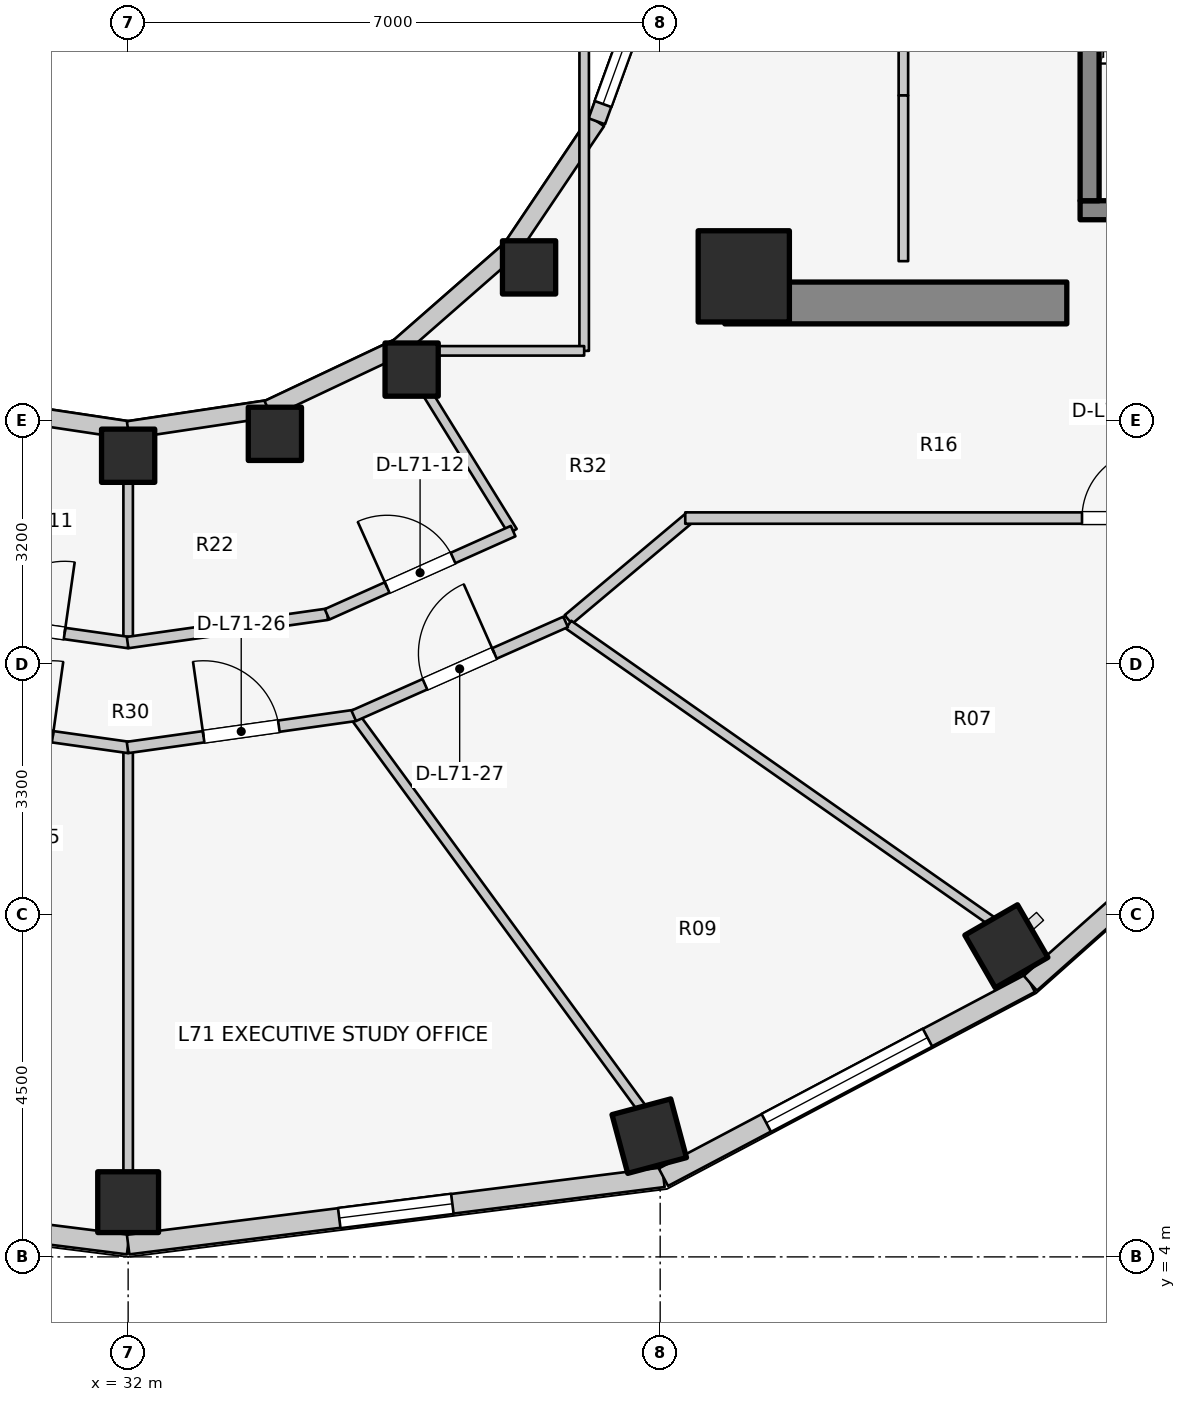
"""IFC4 building model, lengths in metres.
Left out: names, types, materials, properties, quantities, classifications, styles, units other than length and angle.
Written with IfcOpenShell. Run it as: python <this file> out.ifc"""

import sys

from ifc_helpers import new_model, si_unit, direction, frame, frame_2d, origin, origin_2d, place, context, subcontext, project, spatial, rectangle, extrude, element, fill, save


model = new_model("IFC4")
c1 = context("Model", 3, precision=1e-05, world=origin(), true_north=direction((0.0, 1.0)))
c2 = subcontext(c1, "Body", "Model", "MODEL_VIEW")
j1 = project(units=[si_unit("LENGTHUNIT", "METRE"), si_unit("PLANEANGLEUNIT", "RADIAN")], contexts=[c1])
p1 = place(None, origin())
s1 = spatial("IfcSite", under=j1, at=p1, CompositionType="ELEMENT")
p2 = place(p1, origin())
s2 = spatial("IfcBuilding", under=s1, at=p2, CompositionType="ELEMENT")
p3 = place(p2, frame((0.0, 0.0, 232.6)))
s3 = spatial("IfcBuildingStorey", under=s2, at=p3, CompositionType="ELEMENT", Elevation=232.6)
p4 = place(p3, frame((39.85, 16.55, 0.0), z_axis=(0.0, 0.0, 1.0), x_axis=(1.0, 0.0, 0.0)))
e1 = element("IfcWall", 1, at=p4, inside=s3, PredefinedType="SHEAR", context=c2, shape_type="SweptSolid", body=[
    extrude(rectangle(XDim=4.5, YDim=0.55, at=frame_2d((2.25, 0.0))), origin(), (0.0, 0.0, 1.0), 3.1),
])
p5 = place(p3, frame((44.525, 17.77, 0.0), z_axis=(0.0, 0.0, 1.0), x_axis=(1.0, 0.0, 0.0)))
e2 = element("IfcWall", 2, at=p5, inside=s3, PredefinedType="SOLIDWALL", context=c2, shape_type="SweptSolid", body=[
    extrude(rectangle(XDim=3.37, YDim=0.25, at=frame_2d((1.685, 0.0))), origin(), (0.0, 0.0, 1.0), 3.1),
])
p6 = place(p5, frame((1.135, 0.0, 0.0)))
e3 = element("IfcOpeningElement", 3, at=p6, cuts=e2, PredefinedType="OPENING", context=c2, shape_type="SweptSolid", body=[
    extrude(rectangle(XDim=1.1, YDim=2.1, at=frame_2d((0.55, 1.05))), frame((0.0, 0.135, 0.0), z_axis=(0.0, -1.0, 0.0), x_axis=(1.0, 0.0, 0.0)), (0.0, 0.0, 1.0), 0.27),
])
p7 = place(p3, frame((44.65, 17.895, 0.0), z_axis=(0.0, 0.0, 1.0), x_axis=(0.0, 1.0, 0.0)))
e4 = element("IfcWall", 4, at=p7, inside=s3, PredefinedType="SOLIDWALL", context=c2, shape_type="SweptSolid", body=[
    extrude(rectangle(XDim=7.81, YDim=0.25, at=frame_2d((3.905, 0.0))), origin(), (0.0, 0.0, 1.0), 3.1),
])
p8 = place(p3, frame((40.1, 16.9, 0.0), z_axis=(0.0, 0.0, 1.0), x_axis=(1.0, 0.0, 0.0)))
e5 = element("IfcColumn", 5, at=p8, inside=s3, PredefinedType="COLUMN", context=c2, shape_type="SweptSolid", body=[
    extrude(rectangle(XDim=1.2, YDim=1.2, at=origin_2d()), origin(), (0.0, 0.0, 1.0), 3.1),
])
p9 = place(p3, frame((32.0, 14.54, 0.0), z_axis=(0.0, 0.0, 1.0), x_axis=(1.0, 0.0, 0.0)))
e6 = element("IfcColumn", 6, at=p9, inside=s3, PredefinedType="COLUMN", context=c2, shape_type="SweptSolid", body=[
    extrude(rectangle(XDim=0.7, YDim=0.7, at=origin_2d()), origin(), (0.0, 0.0, 1.0), 3.1),
])
p10 = place(p3, frame((32.0, 4.72, 0.0), z_axis=(0.0, 0.0, 1.0), x_axis=(0.0, -1.0, 0.0)))
e7 = element("IfcColumn", 7, at=p10, inside=s3, PredefinedType="COLUMN", context=c2, shape_type="SweptSolid", body=[
    extrude(rectangle(XDim=0.8, YDim=0.8, at=origin_2d()), origin(), (0.0, 0.0, 1.0), 3.1),
])
p11 = place(p3, frame((33.931, 14.828, 0.0), z_axis=(0.0, 0.0, 1.0), x_axis=(1.0, 0.0, 0.0)))
e8 = element("IfcColumn", 8, at=p11, inside=s3, PredefinedType="COLUMN", context=c2, shape_type="SweptSolid", body=[
    extrude(rectangle(XDim=0.7, YDim=0.7, at=origin_2d()), origin(), (0.0, 0.0, 1.0), 3.1),
])
p12 = place(p3, frame((38.856, 5.589, 0.0), z_axis=(0.0, 0.0, 1.0), x_axis=(0.258819045103, -0.965925826289, 0.0)))
e9 = element("IfcColumn", 9, at=p12, inside=s3, PredefinedType="COLUMN", context=c2, shape_type="SweptSolid", body=[
    extrude(rectangle(XDim=0.8, YDim=0.8, at=origin_2d()), origin(), (0.0, 0.0, 1.0), 3.1),
])
p13 = place(p3, frame((35.73, 15.673, 0.0), z_axis=(0.0, 0.0, 1.0), x_axis=(1.0, 0.0, 0.0)))
e10 = element("IfcColumn", 10, at=p13, inside=s3, PredefinedType="COLUMN", context=c2, shape_type="SweptSolid", body=[
    extrude(rectangle(XDim=0.7, YDim=0.7, at=origin_2d()), origin(), (0.0, 0.0, 1.0), 3.1),
])
p14 = place(p3, frame((43.555, 8.086, 0.0), z_axis=(0.0, 0.0, 1.0), x_axis=(0.5, -0.866025403784, 0.0)))
e11 = element("IfcColumn", 11, at=p14, inside=s3, PredefinedType="COLUMN", context=c2, shape_type="SweptSolid", body=[
    extrude(rectangle(XDim=0.8, YDim=0.8, at=origin_2d()), origin(), (0.0, 0.0, 1.0), 3.1),
])
p15 = place(p3, frame((37.275, 17.018, 0.0), z_axis=(0.0, 0.0, 1.0), x_axis=(1.0, 0.0, 0.0)))
e12 = element("IfcColumn", 12, at=p15, inside=s3, PredefinedType="COLUMN", context=c2, shape_type="SweptSolid", body=[
    extrude(rectangle(XDim=0.7, YDim=0.7, at=origin_2d()), origin(), (0.0, 0.0, 1.0), 3.1),
])
for number, where, z_axis, x_axis in (
    (13, (30.157, 15.157, 0.0), (0.0, 0.0, 1.0), (0.989, -0.149, 0.0)),
    (14, (32.0, 14.88, 0.0), (0.0, 0.0, 1.0), (0.989, 0.149, 0.0)),
):
    element("IfcWall", number, at=place(p3, frame(where, z_axis=z_axis, x_axis=x_axis)), inside=s3, PredefinedType="STANDARD", context=c2, shape_type="SweptSolid", body=[
        extrude(rectangle(XDim=1.864, YDim=0.23, at=frame_2d((0.932, 0.0))), origin(), (0.0, 0.0, 1.0), 2.16),
    ])
p16 = place(p3, frame((33.843, 15.157, 0.0), z_axis=(0.0, 0.0, 1.0), x_axis=(0.904179699603, 0.427152280606, 0.0)))
e15 = element("IfcWall", 15, at=p16, inside=s3, PredefinedType="STANDARD", context=c2, shape_type="SweptSolid", body=[
    extrude(rectangle(XDim=1.899, YDim=0.23, at=frame_2d((0.95, 0.0))), origin(), (0.0, 0.0, 1.0), 2.16),
])
p17 = place(p3, frame((35.56, 15.968, 0.0), z_axis=(0.0, 0.0, 1.0), x_axis=(0.752576694707, 0.658504607869, 0.0)))
e16 = element("IfcWall", 16, at=p17, inside=s3, PredefinedType="STANDARD", context=c2, shape_type="SweptSolid", body=[
    extrude(rectangle(XDim=1.959, YDim=0.23, at=frame_2d((0.98, 0.0))), origin(), (0.0, 0.0, 1.0), 2.16),
])
p18 = place(p3, frame((37.035, 17.258, 0.0), z_axis=(0.0, 0.0, 1.0), x_axis=(0.558197800898, 0.829707909492, 0.0)))
e17 = element("IfcWall", 17, at=p18, inside=s3, PredefinedType="STANDARD", context=c2, shape_type="SweptSolid", body=[
    extrude(rectangle(XDim=2.027, YDim=0.23, at=frame_2d((1.013, 0.0))), origin(), (0.0, 0.0, 1.0), 2.16),
])
p19 = place(p3, frame((38.166, 18.94, 0.0), z_axis=(0.0, 0.0, 1.0), x_axis=(0.341423187295, 0.93990968033, 0.0)))
e18 = element("IfcWall", 18, at=p19, inside=s3, PredefinedType="STANDARD", context=c2, shape_type="SweptSolid", body=[
    extrude(rectangle(XDim=2.084, YDim=0.23, at=frame_2d((1.042, 0.0))), origin(), (0.0, 0.0, 1.0), 2.84),
])
p20 = place(p19, frame((0.242, 0.0, 0.85)))
e19 = element("IfcOpeningElement", 19, at=p20, cuts=e18, PredefinedType="OPENING", context=c2, shape_type="SweptSolid", body=[
    extrude(rectangle(XDim=1.6, YDim=1.65, at=frame_2d((0.8, 0.825))), frame((0.0, 0.125, 0.0), z_axis=(0.0, -1.0, 0.0), x_axis=(1.0, 0.0, 0.0)), (0.0, 0.0, 1.0), 0.25),
])
p21 = place(p3, frame((24.957, 5.048, 0.0), z_axis=(0.0, 0.0, 1.0), x_axis=(0.992180211307, -0.124813574142, 0.0)))
e20 = element("IfcWall", 20, at=p21, inside=s3, PredefinedType="STANDARD", context=c2, shape_type="SweptSolid", body=[
    extrude(rectangle(XDim=7.098, YDim=0.26, at=frame_2d((3.549, 0.0))), origin(), (0.0, 0.0, 1.0), 2.85),
])
p22 = place(p21, frame((2.799, 0.0, 0.75)))
e21 = element("IfcOpeningElement", 21, at=p22, cuts=e20, PredefinedType="OPENING", context=c2, shape_type="SweptSolid", body=[
    extrude(rectangle(XDim=1.5, YDim=1.6, at=frame_2d((0.75, 0.8))), frame((0.0, 0.14, 0.0), z_axis=(0.0, -1.0, 0.0), x_axis=(1.0, 0.0, 0.0)), (0.0, 0.0, 1.0), 0.28),
])
p23 = place(p3, frame((32.0, 4.162, 0.0), z_axis=(0.0, 0.0, 1.0), x_axis=(0.992180211307, 0.124813574142, 0.0)))
e22 = element("IfcWall", 22, at=p23, inside=s3, PredefinedType="STANDARD", context=c2, shape_type="SweptSolid", body=[
    extrude(rectangle(XDim=7.098, YDim=0.26, at=frame_2d((3.549, 0.0))), origin(), (0.0, 0.0, 1.0), 2.85),
])
p24 = place(p23, frame((2.799, 0.0, 0.75)))
e23 = element("IfcOpeningElement", 23, at=p24, cuts=e22, PredefinedType="OPENING", context=c2, shape_type="SweptSolid", body=[
    extrude(rectangle(XDim=1.5, YDim=1.6, at=frame_2d((0.75, 0.8))), frame((0.0, 0.14, 0.0), z_axis=(0.0, -1.0, 0.0), x_axis=(1.0, 0.0, 0.0)), (0.0, 0.0, 1.0), 0.28),
])
p25 = place(p3, frame((39.043, 5.048, 0.0), z_axis=(0.0, 0.0, 1.0), x_axis=(0.884000981341, 0.46748504253, 0.0)))
e24 = element("IfcWall", 24, at=p25, inside=s3, PredefinedType="STANDARD", context=c2, shape_type="SweptSolid", body=[
    extrude(rectangle(XDim=5.46, YDim=0.26, at=frame_2d((2.73, 0.0))), origin(), (0.0, 0.0, 1.0), 2.85),
])
p26 = place(p25, frame((1.53, 0.0, 0.75)))
e25 = element("IfcOpeningElement", 25, at=p26, cuts=e24, PredefinedType="OPENING", context=c2, shape_type="SweptSolid", body=[
    extrude(rectangle(XDim=2.4, YDim=1.7, at=frame_2d((1.2, 0.85))), frame((0.0, 0.14, 0.0), z_axis=(0.0, -1.0, 0.0), x_axis=(1.0, 0.0, 0.0)), (0.0, 0.0, 1.0), 0.28),
])
p27 = place(p3, frame((43.87, 7.601, 0.0), z_axis=(0.0, 0.0, 1.0), x_axis=(0.748165854006, 0.663511759428, 0.0)))
e26 = element("IfcWall", 26, at=p27, inside=s3, PredefinedType="STANDARD", context=c2, shape_type="SweptSolid", body=[
    extrude(rectangle(XDim=4.929, YDim=0.26, at=frame_2d((2.464, 0.0))), origin(), (0.0, 0.0, 1.0), 2.85),
])
p28 = place(p3, frame((42.2, 19.28, 0.0), z_axis=(0.0, 0.0, 1.0), x_axis=(0.0, 1.0, 0.0)))
e27 = element("IfcWall", 27, at=p28, inside=s3, PredefinedType="PARTITIONING", context=c2, shape_type="SweptSolid", body=[
    extrude(rectangle(XDim=2.4, YDim=0.125, at=frame_2d((1.2, 0.0))), origin(), (0.0, 0.0, 1.0), 2.855),
])
p29 = place(p28, frame((0.7, 0.0, 0.0)))
e28 = element("IfcOpeningElement", 28, at=p29, cuts=e27, PredefinedType="OPENING", context=c2, shape_type="SweptSolid", body=[
    extrude(rectangle(XDim=0.85, YDim=2.05, at=frame_2d((0.425, 1.025))), frame((0.0, 0.073, 0.0), z_axis=(0.0, -1.0, 0.0), x_axis=(1.0, 0.0, 0.0)), (0.0, 0.0, 1.0), 0.145),
])
p30 = place(p3, frame((42.2, 17.1, 0.0), z_axis=(0.0, 0.0, 1.0), x_axis=(0.0, 1.0, 0.0)))
e29 = element("IfcWall", 29, at=p30, inside=s3, PredefinedType="PARTITIONING", context=c2, shape_type="SweptSolid", body=[
    extrude(rectangle(XDim=2.18, YDim=0.125, at=frame_2d((1.09, 0.0))), origin(), (0.0, 0.0, 1.0), 2.855),
])
p31 = place(p3, frame((32.0, 14.9, 0.0), z_axis=(0.0, 0.0, 1.0), x_axis=(0.0, -1.0, 0.0)))
e30 = element("IfcWall", 30, at=p31, inside=s3, PredefinedType="PARTITIONING", context=c2, shape_type="SweptSolid", body=[
    extrude(rectangle(XDim=2.818, YDim=0.125, at=frame_2d((1.409, 0.0))), origin(), (0.0, 0.0, 1.0), 2.376),
])
p32 = place(p3, frame((35.55, 15.985, 0.0), z_axis=(0.0, 0.0, 1.0), x_axis=(0.52592395012, -0.850531597702, 0.0)))
e31 = element("IfcWall", 31, at=p32, inside=s3, PredefinedType="PARTITIONING", context=c2, shape_type="SweptSolid", body=[
    extrude(rectangle(XDim=2.869, YDim=0.125, at=frame_2d((1.435, 0.0))), origin(), (0.0, 0.0, 1.0), 2.376),
])
p33 = place(p3, frame((29.38, 12.455, 0.0), z_axis=(0.0, 0.0, 1.0), x_axis=(0.990096156252, -0.140390887794, 0.0)))
e32 = element("IfcWall", 32, at=p33, inside=s3, PredefinedType="PARTITIONING", context=c2, shape_type="SweptSolid", body=[
    extrude(rectangle(XDim=2.654, YDim=0.15, at=frame_2d((1.327, 0.0))), origin(), (0.0, 0.0, 1.0), 2.376),
])
p34 = place(p33, frame((0.852, 0.0, 0.0)))
e33 = element("IfcOpeningElement", 33, at=p34, cuts=e32, PredefinedType="OPENING", context=c2, shape_type="SweptSolid", body=[
    extrude(rectangle(XDim=0.95, YDim=2.1, at=frame_2d((0.475, 1.05))), frame((0.0, 0.085, 0.0), z_axis=(0.0, -1.0, 0.0), x_axis=(1.0, 0.0, 0.0)), (0.0, 0.0, 1.0), 0.17),
])
p35 = place(p3, frame((31.993, 12.082, 0.0), z_axis=(0.0, 0.0, 1.0), x_axis=(0.990096156252, 0.140390887794, 0.0)))
e34 = element("IfcWall", 34, at=p35, inside=s3, PredefinedType="PARTITIONING", context=c2, shape_type="SweptSolid", body=[
    extrude(rectangle(XDim=2.654, YDim=0.15, at=frame_2d((1.327, 0.0))), origin(), (0.0, 0.0, 1.0), 2.376),
])
p36 = place(p3, frame((34.617, 12.454, 0.0), z_axis=(0.0, 0.0, 1.0), x_axis=(0.912859324183, 0.408274239027, 0.0)))
e35 = element("IfcWall", 35, at=p36, inside=s3, PredefinedType="PARTITIONING", context=c2, shape_type="SweptSolid", body=[
    extrude(rectangle(XDim=2.682, YDim=0.15, at=frame_2d((1.341, 0.0))), origin(), (0.0, 0.0, 1.0), 2.376),
])
p37 = place(p36, frame((0.866, 0.0, 0.0)))
e36 = element("IfcOpeningElement", 36, at=p37, cuts=e35, PredefinedType="OPENING", context=c2, shape_type="SweptSolid", body=[
    extrude(rectangle(XDim=0.95, YDim=2.1, at=frame_2d((0.475, 1.05))), frame((0.0, 0.085, 0.0), z_axis=(0.0, -1.0, 0.0), x_axis=(1.0, 0.0, 0.0)), (0.0, 0.0, 1.0), 0.17),
])
p38 = place(p3, frame((38.0, 15.92, 0.0), z_axis=(0.0, 0.0, 1.0), x_axis=(0.0, 1.0, 0.0)))
e37 = element("IfcWall", 37, at=p38, inside=s3, PredefinedType="PARTITIONING", context=c2, shape_type="SweptSolid", body=[
    extrude(rectangle(XDim=4.28, YDim=0.125, at=frame_2d((2.14, 0.0))), origin(), (0.0, 0.0, 1.0), 2.232),
])
p39 = place(p3, frame((35.4, 15.92, 0.0), z_axis=(0.0, 0.0, 1.0), x_axis=(1.0, 0.0, 0.0)))
e38 = element("IfcWall", 38, at=p39, inside=s3, PredefinedType="PARTITIONING", context=c2, shape_type="SweptSolid", body=[
    extrude(rectangle(XDim=2.6, YDim=0.125, at=frame_2d((1.3, 0.0))), origin(), (0.0, 0.0, 1.0), 2.232),
])
p40 = place(p3, frame((37.791, 12.385, 0.0), z_axis=(0.0, 0.0, 1.0), x_axis=(0.765677451641, 0.643224719711, 0.0)))
e39 = element("IfcWall", 39, at=p40, inside=s3, PredefinedType="PARTITIONING", context=c2, shape_type="SweptSolid", body=[
    extrude(rectangle(XDim=2.105, YDim=0.15, at=frame_2d((1.053, 0.0))), origin(), (0.0, 0.0, 1.0), 2.376),
])
p41 = place(p3, frame((39.33, 13.72, 0.0), z_axis=(0.0, 0.0, 1.0), x_axis=(1.0, 0.0, 0.0)))
e40 = element("IfcWall", 40, at=p41, inside=s3, PredefinedType="PARTITIONING", context=c2, shape_type="SweptSolid", body=[
    extrude(rectangle(XDim=7.52, YDim=0.15, at=frame_2d((3.76, 0.0))), origin(), (0.0, 0.0, 1.0), 2.376),
])
p42 = place(p41, frame((5.22, 0.0, 0.0)))
e41 = element("IfcOpeningElement", 41, at=p42, cuts=e40, PredefinedType="OPENING", context=c2, shape_type="SweptSolid", body=[
    extrude(rectangle(XDim=0.9, YDim=2.1, at=frame_2d((0.45, 1.05))), frame((0.0, 0.085, 0.0), z_axis=(0.0, -1.0, 0.0), x_axis=(1.0, 0.0, 0.0)), (0.0, 0.0, 1.0), 0.17),
])
p43 = place(p3, frame((32.0, 10.647, 0.0), z_axis=(0.0, 0.0, 1.0), x_axis=(0.0, -1.0, 0.0)))
e42 = element("IfcWall", 42, at=p43, inside=s3, PredefinedType="PARTITIONING", context=c2, shape_type="SweptSolid", body=[
    extrude(rectangle(XDim=5.547, YDim=0.125, at=frame_2d((2.773, 0.0))), origin(), (0.0, 0.0, 1.0), 2.376),
])
p44 = place(p3, frame((35.008, 11.077, 0.0), z_axis=(0.0, 0.0, 1.0), x_axis=(0.590771495169, -0.806838918555, 0.0)))
e43 = element("IfcWall", 43, at=p44, inside=s3, PredefinedType="PARTITIONING", context=c2, shape_type="SweptSolid", body=[
    extrude(rectangle(XDim=6.347, YDim=0.125, at=frame_2d((3.173, 0.0))), origin(), (0.0, 0.0, 1.0), 2.376),
])
p45 = place(p3, frame((37.794, 12.318, 0.0), z_axis=(0.0, 0.0, 1.0), x_axis=(0.819017716307, -0.573768228796, 0.0)))
e44 = element("IfcWall", 44, at=p45, inside=s3, PredefinedType="PARTITIONING", context=c2, shape_type="SweptSolid", body=[
    extrude(rectangle(XDim=6.802, YDim=0.125, at=frame_2d((3.401, 0.0))), origin(), (0.0, 0.0, 1.0), 2.376),
])
p46 = place(p3, frame((29.016, 11.123, 0.0), z_axis=(0.0, 0.0, 1.0), x_axis=(0.990225561979, -0.139475217886, 0.0)))
e45 = element("IfcWall", 45, at=p46, inside=s3, PredefinedType="PARTITIONING", context=c2, shape_type="SweptSolid", body=[
    extrude(rectangle(XDim=3.021, YDim=0.15, at=frame_2d((1.511, 0.0))), origin(), (0.0, 0.0, 1.0), 2.376),
])
p47 = place(p46, frame((1.01, 0.0, 0.0)))
e46 = element("IfcOpeningElement", 46, at=p47, cuts=e45, PredefinedType="OPENING", context=c2, shape_type="SweptSolid", body=[
    extrude(rectangle(XDim=1.0, YDim=2.1, at=frame_2d((0.5, 1.05))), frame((0.0, 0.085, 0.0), z_axis=(0.0, -1.0, 0.0), x_axis=(1.0, 0.0, 0.0)), (0.0, 0.0, 1.0), 0.17),
])
p48 = place(p3, frame((31.992, 10.702, 0.0), z_axis=(0.0, 0.0, 1.0), x_axis=(0.990225561979, 0.139475217886, 0.0)))
e47 = element("IfcWall", 47, at=p48, inside=s3, PredefinedType="PARTITIONING", context=c2, shape_type="SweptSolid", body=[
    extrude(rectangle(XDim=3.021, YDim=0.15, at=frame_2d((1.511, 0.0))), origin(), (0.0, 0.0, 1.0), 2.376),
])
p49 = place(p48, frame((1.01, 0.0, 0.0)))
e48 = element("IfcOpeningElement", 48, at=p49, cuts=e47, PredefinedType="OPENING", context=c2, shape_type="SweptSolid", body=[
    extrude(rectangle(XDim=1.0, YDim=2.1, at=frame_2d((0.5, 1.05))), frame((0.0, 0.085, 0.0), z_axis=(0.0, -1.0, 0.0), x_axis=(1.0, 0.0, 0.0)), (0.0, 0.0, 1.0), 0.17),
])
p50 = place(p3, frame((34.968, 11.119, 0.0), z_axis=(0.0, 0.0, 1.0), x_axis=(0.914302802833, 0.405031337963, 0.0)))
e49 = element("IfcWall", 49, at=p50, inside=s3, PredefinedType="PARTITIONING", context=c2, shape_type="SweptSolid", body=[
    extrude(rectangle(XDim=3.049, YDim=0.15, at=frame_2d((1.525, 0.0))), origin(), (0.0, 0.0, 1.0), 2.376),
])
p51 = place(p50, frame((1.025, 0.0, 0.0)))
e50 = element("IfcOpeningElement", 50, at=p51, cuts=e49, PredefinedType="OPENING", context=c2, shape_type="SweptSolid", body=[
    extrude(rectangle(XDim=1.0, YDim=2.1, at=frame_2d((0.5, 1.05))), frame((0.0, 0.085, 0.0), z_axis=(0.0, -1.0, 0.0), x_axis=(1.0, 0.0, 0.0)), (0.0, 0.0, 1.0), 0.17),
])
p52 = place(p20, origin())
e51 = element("IfcWindow", 51, at=p52, inside=s3, PartitioningType="SINGLE_PANEL", PredefinedType="WINDOW", context=c2, shape_type="SweptSolid", body=[
    extrude(rectangle(XDim=1.6, YDim=1.65, at=frame_2d((0.8, 0.825))), frame((0.0, 0.03, 0.0), z_axis=(0.0, -1.0, 0.0), x_axis=(1.0, 0.0, 0.0)), (0.0, 0.0, 1.0), 0.06),
])
fill(e19, e51)
p53 = place(p24, origin())
e52 = element("IfcWindow", 52, at=p53, inside=s3, PartitioningType="SINGLE_PANEL", PredefinedType="WINDOW", context=c2, shape_type="SweptSolid", body=[
    extrude(rectangle(XDim=1.5, YDim=1.6, at=frame_2d((0.75, 0.8))), frame((0.0, 0.03, 0.0), z_axis=(0.0, -1.0, 0.0), x_axis=(1.0, 0.0, 0.0)), (0.0, 0.0, 1.0), 0.06),
])
fill(e23, e52)
p54 = place(p26, origin())
e53 = element("IfcWindow", 53, at=p54, inside=s3, PartitioningType="SINGLE_PANEL", PredefinedType="WINDOW", context=c2, shape_type="SweptSolid", body=[
    extrude(rectangle(XDim=2.4, YDim=1.7, at=frame_2d((1.2, 0.85))), frame((0.0, 0.03, 0.0), z_axis=(0.0, -1.0, 0.0), x_axis=(1.0, 0.0, 0.0)), (0.0, 0.0, 1.0), 0.06),
])
fill(e25, e53)
p55 = place(p34, origin())
e54 = element("IfcDoor", 54, at=p55, inside=s3, OperationType="SINGLE_SWING_RIGHT", PredefinedType="DOOR", context=c2, shape_type="SweptSolid", body=[
    extrude(rectangle(XDim=0.95, YDim=2.1, at=frame_2d((0.475, 1.05))), frame((0.0, 0.025, 0.0), z_axis=(0.0, -1.0, 0.0), x_axis=(1.0, 0.0, 0.0)), (0.0, 0.0, 1.0), 0.05),
])
fill(e33, e54)
p56 = place(p37, origin())
e55 = element("IfcDoor", 55, at=p56, inside=s3, OperationType="SINGLE_SWING_LEFT", PredefinedType="DOOR", context=c2, shape_type="SweptSolid", body=[
    extrude(rectangle(XDim=0.95, YDim=2.1, at=frame_2d((0.475, 1.05))), frame((0.0, 0.025, 0.0), z_axis=(0.0, -1.0, 0.0), x_axis=(1.0, 0.0, 0.0)), (0.0, 0.0, 1.0), 0.05),
])
fill(e36, e55)
p57 = place(p42, origin())
e56 = element("IfcDoor", 56, at=p57, inside=s3, OperationType="SINGLE_SWING_RIGHT", PredefinedType="DOOR", context=c2, shape_type="SweptSolid", body=[
    extrude(rectangle(XDim=0.9, YDim=2.1, at=frame_2d((0.45, 1.05))), frame((0.0, 0.025, 0.0), z_axis=(0.0, -1.0, 0.0), x_axis=(1.0, 0.0, 0.0)), (0.0, 0.0, 1.0), 0.05),
])
fill(e41, e56)
p58 = place(p47, origin())
e57 = element("IfcDoor", 57, at=p58, inside=s3, OperationType="SINGLE_SWING_RIGHT", PredefinedType="DOOR", context=c2, shape_type="SweptSolid", body=[
    extrude(rectangle(XDim=1.0, YDim=2.1, at=frame_2d((0.5, 1.05))), frame((0.0, 0.025, 0.0), z_axis=(0.0, -1.0, 0.0), x_axis=(1.0, 0.0, 0.0)), (0.0, 0.0, 1.0), 0.05),
])
fill(e46, e57)
p59 = place(p49, origin())
e58 = element("IfcDoor", 58, at=p59, inside=s3, OperationType="SINGLE_SWING_LEFT", PredefinedType="DOOR", context=c2, shape_type="SweptSolid", body=[
    extrude(rectangle(XDim=1.0, YDim=2.1, at=frame_2d((0.5, 1.05))), frame((0.0, 0.025, 0.0), z_axis=(0.0, -1.0, 0.0), x_axis=(1.0, 0.0, 0.0)), (0.0, 0.0, 1.0), 0.05),
])
fill(e48, e58)
p60 = place(p51, origin())
e59 = element("IfcDoor", 59, at=p60, inside=s3, OperationType="SINGLE_SWING_RIGHT", PredefinedType="DOOR", context=c2, shape_type="SweptSolid", body=[
    extrude(rectangle(XDim=1.0, YDim=2.1, at=frame_2d((0.5, 1.05))), frame((0.0, 0.025, 0.0), z_axis=(0.0, -1.0, 0.0), x_axis=(1.0, 0.0, 0.0)), (0.0, 0.0, 1.0), 0.05),
])
fill(e50, e59)
save(model, sys.argv[1])
